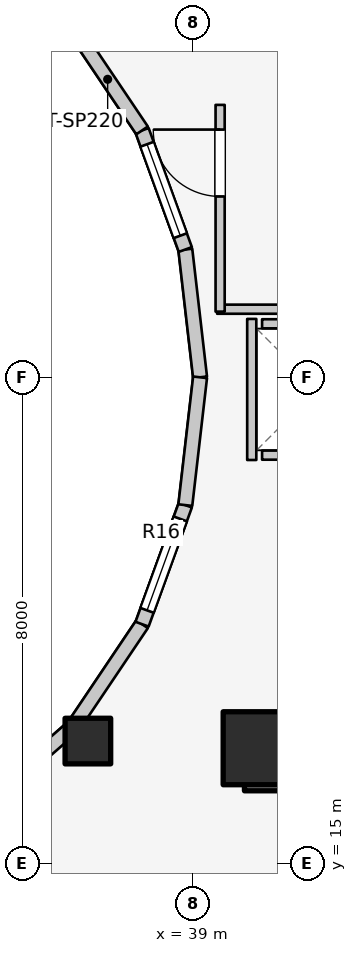
"""IFC4 building model, lengths in metres.
Left out: names, types, materials, properties, quantities, classifications, styles, units other than length and angle.
Written with IfcOpenShell. Run it as: python <this file> out.ifc"""

import sys

from ifc_helpers import new_model, si_unit, direction, frame, frame_2d, origin, origin_2d, place, context, subcontext, project, spatial, rectangle, extrude, element, fill, save


model = new_model("IFC4")
c1 = context("Model", 3, precision=1e-05, world=origin(), true_north=direction((0.0, 1.0)))
c2 = subcontext(c1, "Body", "Model", "MODEL_VIEW")
j1 = project(units=[si_unit("LENGTHUNIT", "METRE"), si_unit("PLANEANGLEUNIT", "RADIAN")], contexts=[c1])
p1 = place(None, origin())
s1 = spatial("IfcSite", under=j1, at=p1, CompositionType="ELEMENT")
p2 = place(p1, origin())
s2 = spatial("IfcBuilding", under=s1, at=p2, CompositionType="ELEMENT")
p3 = place(p2, frame((0.0, 0.0, 143.6)))
s3 = spatial("IfcBuildingStorey", under=s2, at=p3, CompositionType="ELEMENT", Elevation=143.6)
p4 = place(p3, frame((39.85, 16.55, 0.0), z_axis=(0.0, 0.0, 1.0), x_axis=(1.0, 0.0, 0.0)))
e1 = element("IfcWall", 1, at=p4, inside=s3, PredefinedType="SHEAR", context=c2, shape_type="SweptSolid", body=[
    extrude(rectangle(XDim=4.5, YDim=0.7, at=frame_2d((2.25, 0.0))), origin(), (0.0, 0.0, 1.0), 3.1),
])
p5 = place(p3, frame((40.1, 16.9, 0.0), z_axis=(0.0, 0.0, 1.0), x_axis=(1.0, 0.0, 0.0)))
e2 = element("IfcColumn", 2, at=p5, inside=s3, PredefinedType="COLUMN", context=c2, shape_type="SweptSolid", body=[
    extrude(rectangle(XDim=1.2, YDim=1.2, at=origin_2d()), origin(), (0.0, 0.0, 1.0), 3.1),
])
p6 = place(p3, frame((37.275, 17.018, 0.0), z_axis=(0.0, 0.0, 1.0), x_axis=(1.0, 0.0, 0.0)))
e3 = element("IfcColumn", 3, at=p6, inside=s3, PredefinedType="COLUMN", context=c2, shape_type="SweptSolid", body=[
    extrude(rectangle(XDim=0.75, YDim=0.75, at=origin_2d()), origin(), (0.0, 0.0, 1.0), 3.1),
])
p7 = place(p3, frame((39.12, 23.0, 0.0), z_axis=(0.0, 0.0, 1.0), x_axis=(-0.114711713601, 0.993398823617, 0.0)))
e4 = element("IfcWall", 4, at=p7, inside=s3, PredefinedType="STANDARD", context=c2, shape_type="SweptSolid", body=[
    extrude(rectangle(XDim=2.115, YDim=0.23, at=frame_2d((1.058, 0.0))), origin(), (0.0, 0.0, 1.0), 2.84),
])
p8 = place(p3, frame((38.877, 25.102, 0.0), z_axis=(0.0, 0.0, 1.0), x_axis=(-0.341423187295, 0.93990968033, 0.0)))
e5 = element("IfcWall", 5, at=p8, inside=s3, PredefinedType="STANDARD", context=c2, shape_type="SweptSolid", body=[
    extrude(rectangle(XDim=2.084, YDim=0.23, at=frame_2d((1.042, 0.0))), origin(), (0.0, 0.0, 1.0), 2.84),
])
p9 = place(p8, frame((0.242, 0.0, 0.85)))
e6 = element("IfcOpeningElement", 6, at=p9, cuts=e5, PredefinedType="OPENING", context=c2, shape_type="SweptSolid", body=[
    extrude(rectangle(XDim=1.6, YDim=1.65, at=frame_2d((0.8, 0.825))), frame((0.0, 0.125, 0.0), z_axis=(0.0, -1.0, 0.0), x_axis=(1.0, 0.0, 0.0)), (0.0, 0.0, 1.0), 0.25),
])
p10 = place(p3, frame((38.166, 27.06, 0.0), z_axis=(0.0, 0.0, 1.0), x_axis=(-0.558197800898, 0.829707909492, 0.0)))
e7 = element("IfcWall", 7, at=p10, inside=s3, PredefinedType="STANDARD", context=c2, shape_type="SweptSolid", body=[
    extrude(rectangle(XDim=2.027, YDim=0.23, at=frame_2d((1.013, 0.0))), origin(), (0.0, 0.0, 1.0), 2.16),
])
p11 = place(p3, frame((35.56, 15.968, 0.0), z_axis=(0.0, 0.0, 1.0), x_axis=(0.752576694707, 0.658504607869, 0.0)))
e8 = element("IfcWall", 8, at=p11, inside=s3, PredefinedType="STANDARD", context=c2, shape_type="SweptSolid", body=[
    extrude(rectangle(XDim=1.959, YDim=0.23, at=frame_2d((0.98, 0.0))), origin(), (0.0, 0.0, 1.0), 2.16),
])
p12 = place(p3, frame((37.035, 17.258, 0.0), z_axis=(0.0, 0.0, 1.0), x_axis=(0.558197800898, 0.829707909492, 0.0)))
e9 = element("IfcWall", 9, at=p12, inside=s3, PredefinedType="STANDARD", context=c2, shape_type="SweptSolid", body=[
    extrude(rectangle(XDim=2.027, YDim=0.23, at=frame_2d((1.013, 0.0))), origin(), (0.0, 0.0, 1.0), 2.16),
])
p13 = place(p3, frame((38.166, 18.94, 0.0), z_axis=(0.0, 0.0, 1.0), x_axis=(0.341423187295, 0.93990968033, 0.0)))
e10 = element("IfcWall", 10, at=p13, inside=s3, PredefinedType="STANDARD", context=c2, shape_type="SweptSolid", body=[
    extrude(rectangle(XDim=2.084, YDim=0.23, at=frame_2d((1.042, 0.0))), origin(), (0.0, 0.0, 1.0), 2.84),
])
p14 = place(p13, frame((0.242, 0.0, 0.85)))
e11 = element("IfcOpeningElement", 11, at=p14, cuts=e10, PredefinedType="OPENING", context=c2, shape_type="SweptSolid", body=[
    extrude(rectangle(XDim=1.6, YDim=1.65, at=frame_2d((0.8, 0.825))), frame((0.0, 0.125, 0.0), z_axis=(0.0, -1.0, 0.0), x_axis=(1.0, 0.0, 0.0)), (0.0, 0.0, 1.0), 0.25),
])
p15 = place(p3, frame((38.877, 20.898, 0.0), z_axis=(0.0, 0.0, 1.0), x_axis=(0.114711713601, 0.993398823617, 0.0)))
e12 = element("IfcWall", 12, at=p15, inside=s3, PredefinedType="STANDARD", context=c2, shape_type="SweptSolid", body=[
    extrude(rectangle(XDim=2.115, YDim=0.23, at=frame_2d((1.058, 0.0))), origin(), (0.0, 0.0, 1.0), 2.84),
])
for number, where, z_axis, x_axis in (
    (13, (40.14, 21.72, 0.0), (0.0, 0.0, 1.0), (1.0, 0.0, 0.0)),
    (14, (40.14, 23.88, 0.0), (0.0, 0.0, 1.0), (1.0, 0.0, 0.0)),
):
    element("IfcWall", number, at=place(p3, frame(where, z_axis=z_axis, x_axis=x_axis)), inside=s3, PredefinedType="SOLIDWALL", context=c2, shape_type="SweptSolid", body=[
        extrude(rectangle(XDim=1.82, YDim=0.15, at=frame_2d((0.91, 0.0))), origin(), (0.0, 0.0, 1.0), 2.12),
    ])
p16 = place(p3, frame((39.97, 21.64, 0.0), z_axis=(0.0, 0.0, 1.0), x_axis=(0.0, 1.0, 0.0)))
e15 = element("IfcWall", 15, at=p16, inside=s3, PredefinedType="SOLIDWALL", context=c2, shape_type="SweptSolid", body=[
    extrude(rectangle(XDim=2.32, YDim=0.15, at=frame_2d((1.16, 0.0))), origin(), (0.0, 0.0, 1.0), 2.12),
])
p17 = place(p3, frame((39.4, 24.12, 0.0), z_axis=(0.0, 0.0, 1.0), x_axis=(1.0, 0.0, 0.0)))
e16 = element("IfcWall", 16, at=p17, inside=s3, PredefinedType="PARTITIONING", context=c2, shape_type="SweptSolid", body=[
    extrude(rectangle(XDim=5.08, YDim=0.15, at=frame_2d((2.54, 0.0))), origin(), (0.0, 0.0, 1.0), 2.12),
])
p18 = place(p3, frame((39.45, 24.08, 0.0), z_axis=(0.0, 0.0, 1.0), x_axis=(0.0, 1.0, 0.0)))
e17 = element("IfcWall", 17, at=p18, inside=s3, PredefinedType="PARTITIONING", context=c2, shape_type="SweptSolid", body=[
    extrude(rectangle(XDim=3.4, YDim=0.15, at=frame_2d((1.7, 0.0))), origin(), (0.0, 0.0, 1.0), 2.855),
])
p19 = place(p18, frame((1.894, 0.0, 0.0)))
e18 = element("IfcOpeningElement", 18, at=p19, cuts=e17, PredefinedType="OPENING", context=c2, shape_type="SweptSolid", body=[
    extrude(rectangle(XDim=1.1, YDim=2.1, at=frame_2d((0.55, 1.05))), frame((0.0, 0.085, 0.0), z_axis=(0.0, -1.0, 0.0), x_axis=(1.0, 0.0, 0.0)), (0.0, 0.0, 1.0), 0.17),
])
p20 = place(p3, frame((35.55, 15.985, 0.0), z_axis=(0.0, 0.0, 1.0), x_axis=(0.524565340045, -0.851370192116, 0.0)))
e19 = element("IfcWall", 19, at=p20, inside=s3, PredefinedType="PARTITIONING", context=c2, shape_type="SweptSolid", body=[
    extrude(rectangle(XDim=3.027, YDim=0.125, at=frame_2d((1.514, 0.0))), origin(), (0.0, 0.0, 1.0), 2.299),
])
p21 = place(p9, origin())
e20 = element("IfcWindow", 20, at=p21, inside=s3, PartitioningType="SINGLE_PANEL", PredefinedType="WINDOW", context=c2, shape_type="SweptSolid", body=[
    extrude(rectangle(XDim=1.6, YDim=1.65, at=frame_2d((0.8, 0.825))), frame((0.0, 0.03, 0.0), z_axis=(0.0, -1.0, 0.0), x_axis=(1.0, 0.0, 0.0)), (0.0, 0.0, 1.0), 0.06),
])
fill(e6, e20)
p22 = place(p14, origin())
e21 = element("IfcWindow", 21, at=p22, inside=s3, PartitioningType="SINGLE_PANEL", PredefinedType="WINDOW", context=c2, shape_type="SweptSolid", body=[
    extrude(rectangle(XDim=1.6, YDim=1.65, at=frame_2d((0.8, 0.825))), frame((0.0, 0.03, 0.0), z_axis=(0.0, -1.0, 0.0), x_axis=(1.0, 0.0, 0.0)), (0.0, 0.0, 1.0), 0.06),
])
fill(e11, e21)
p23 = place(p19, origin())
e22 = element("IfcDoor", 22, at=p23, inside=s3, OperationType="SINGLE_SWING_RIGHT", PredefinedType="DOOR", context=c2, shape_type="SweptSolid", body=[
    extrude(rectangle(XDim=1.1, YDim=2.1, at=frame_2d((0.55, 1.05))), frame((0.0, 0.025, 0.0), z_axis=(0.0, -1.0, 0.0), x_axis=(1.0, 0.0, 0.0)), (0.0, 0.0, 1.0), 0.05),
])
fill(e18, e22)
save(model, sys.argv[1])
